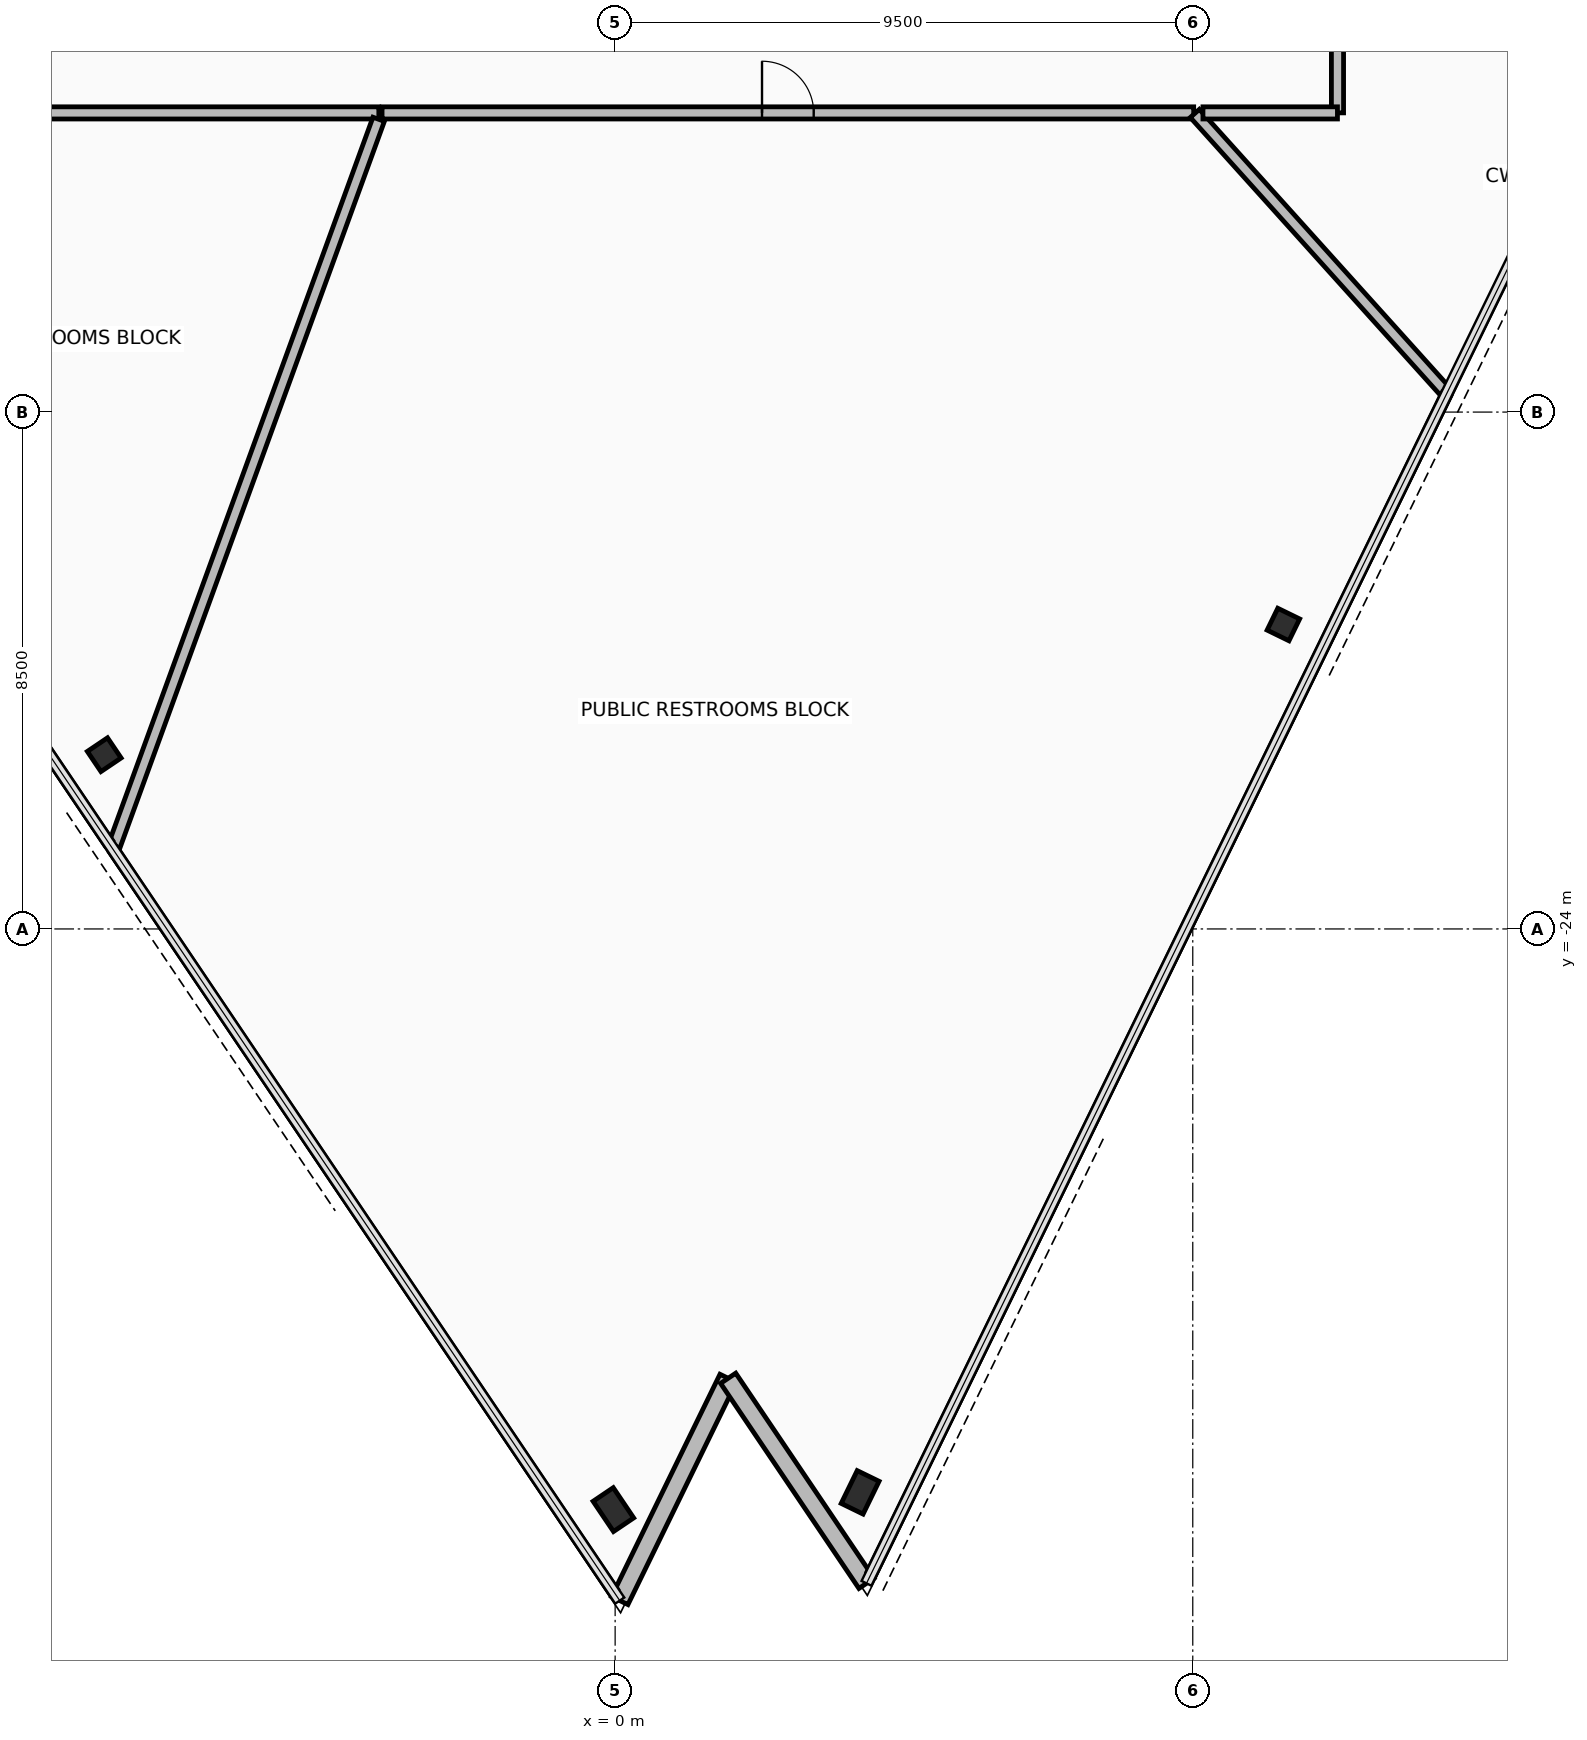
"""IFC4 building model, lengths in metres.
Left out: names, types, materials, properties, quantities, classifications, styles, units other than length and angle.
Written with IfcOpenShell. Run it as: python <this file> out.ifc"""

import sys

from ifc_helpers import new_model, si_unit, direction, frame, frame_2d, origin, origin_2d, place, context, subcontext, project, spatial, rectangle, hollow_rectangle, extrude, element, fill, save


model = new_model("IFC4")
c1 = context("Model", 3, precision=1e-05, world=origin(), true_north=direction((0.0, 1.0)))
c2 = subcontext(c1, "Body", "Model", "MODEL_VIEW")
j1 = project(units=[si_unit("LENGTHUNIT", "METRE"), si_unit("PLANEANGLEUNIT", "RADIAN")], contexts=[c1])
p1 = place(None, origin())
s1 = spatial("IfcSite", under=j1, at=p1, CompositionType="ELEMENT")
p2 = place(p1, origin())
s2 = spatial("IfcBuilding", under=s1, at=p2, CompositionType="ELEMENT")
p3 = place(p2, frame((0.0, 0.0, 257.0)))
s3 = spatial("IfcBuildingStorey", under=s2, at=p3, CompositionType="ELEMENT", Elevation=257.0)
p4 = place(p3, frame((-8.402, -21.135, 0.0), z_axis=(0.0, 0.0, 1.0), x_axis=(-0.559192903471, 0.829037572555, 0.0)))
e1 = element("IfcColumn", 1, at=p4, inside=s3, PredefinedType="COLUMN", context=c2, shape_type="SweptSolid", body=[
    extrude(hollow_rectangle(XDim=0.4, YDim=0.4, WallThickness=0.025, at=origin_2d()), origin(), (0.0, 0.0, 1.0), 3.6),
])
for number, where, z_axis, x_axis in (
    (2, (-0.029, -33.549, 0.0), (0.0, 0.0, 1.0), (-0.559, 0.829, 0.0)),
    (3, (4.029, -33.265, 0.0), (0.0, 0.0, 1.0), (0.438, 0.899, 0.0)),
):
    element("IfcColumn", number, at=place(p3, frame(where, z_axis=z_axis, x_axis=x_axis)), inside=s3, PredefinedType="COLUMN", context=c2, shape_type="SweptSolid", body=[
        extrude(hollow_rectangle(XDim=0.4, YDim=0.6, WallThickness=0.03, at=origin_2d()), origin(), (0.0, 0.0, 1.0), 3.6),
    ])
p5 = place(p3, frame((10.99, -18.994, 0.0), z_axis=(0.0, 0.0, 1.0), x_axis=(0.43837271548, 0.898793281196, 0.0)))
e4 = element("IfcColumn", 4, at=p5, inside=s3, PredefinedType="COLUMN", context=c2, shape_type="SweptSolid", body=[
    extrude(hollow_rectangle(XDim=0.4, YDim=0.4, WallThickness=0.025, at=origin_2d()), origin(), (0.0, 0.0, 1.0), 3.6),
])
p6 = place(p3, frame((0.076, -35.045, 0.0), z_axis=(0.0, 0.0, 1.0), x_axis=(0.438357414153, 0.898800744024, 0.0)))
e5 = element("IfcWall", 5, at=p6, inside=s3, PredefinedType="STANDARD", context=c2, shape_type="SweptSolid", body=[
    extrude(rectangle(XDim=4.068, YDim=0.3, at=frame_2d((2.034, 0.0))), origin(), (0.0, 0.0, 1.0), 2.765),
])
p7 = place(p3, frame((1.859, -31.389, 0.0), z_axis=(0.0, 0.0, 1.0), x_axis=(0.559206900681, -0.829028131145, 0.0)))
e6 = element("IfcWall", 6, at=p7, inside=s3, PredefinedType="STANDARD", context=c2, shape_type="SweptSolid", body=[
    extrude(rectangle(XDim=4.068, YDim=0.3, at=frame_2d((2.034, 0.0))), origin(), (0.0, 0.0, 1.0), 2.765),
])
p8 = place(p3, frame((-11.879, -10.58, 0.0), z_axis=(0.0, 0.0, 1.0), x_axis=(1.0, 0.0, 0.0)))
e7 = element("IfcWall", 7, at=p8, inside=s3, PredefinedType="PARTITIONING", context=c2, shape_type="SweptSolid", body=[
    extrude(rectangle(XDim=7.993, YDim=0.2, at=frame_2d((3.997, 0.0))), origin(), (0.0, 0.0, 1.0), 2.915),
])
p9 = place(p3, frame((-3.889, -10.685, 0.0), z_axis=(0.0, 0.0, 1.0), x_axis=(-0.342029991506, -0.939689036283, 0.0)))
e8 = element("IfcWall", 8, at=p9, inside=s3, PredefinedType="PARTITIONING", context=c2, shape_type="SweptSolid", body=[
    extrude(rectangle(XDim=12.775, YDim=0.2, at=frame_2d((6.387, 0.0))), origin(), (0.0, 0.0, 1.0), 2.765),
])
p10 = place(p3, frame((-8.331, -22.582, 0.0), z_axis=(0.0, 0.0, 1.0), x_axis=(-0.559190048569, 0.829039498203, 0.0)))
e9 = element("IfcWall", 9, at=p10, inside=s3, PredefinedType="PARTITIONING", context=c2, shape_type="SweptSolid", body=[
    extrude(rectangle(XDim=23.473, YDim=0.15, at=frame_2d((11.737, 0.0))), origin(), (0.0, 0.0, 1.0), 3.42),
])
p11 = place(p3, frame((-0.024, -34.897, 0.0), z_axis=(0.0, 0.0, 1.0), x_axis=(-0.55919551537, 0.829035810801, 0.0)))
e10 = element("IfcWall", 10, at=p11, inside=s3, PredefinedType="PARTITIONING", context=c2, shape_type="SweptSolid", body=[
    extrude(rectangle(XDim=14.712, YDim=0.15, at=frame_2d((7.356, 0.0))), origin(), (0.0, 0.0, 1.0), 3.42),
])
p12 = place(p3, frame((-3.833, -10.58, 0.0), z_axis=(0.0, 0.0, 1.0), x_axis=(1.0, 0.0, 0.0)))
e11 = element("IfcWall", 11, at=p12, inside=s3, PredefinedType="PARTITIONING", context=c2, shape_type="SweptSolid", body=[
    extrude(rectangle(XDim=13.348, YDim=0.2, at=frame_2d((6.674, 0.0))), origin(), (0.0, 0.0, 1.0), 2.915),
])
p13 = place(p12, frame((6.249, 0.0, 0.0)))
e12 = element("IfcOpeningElement", 12, at=p13, cuts=e11, PredefinedType="OPENING", context=c2, shape_type="SweptSolid", body=[
    extrude(rectangle(XDim=0.85, YDim=2.1, at=frame_2d((0.425, 1.05))), frame((0.0, 0.11, 0.0), z_axis=(0.0, -1.0, 0.0), x_axis=(1.0, 0.0, 0.0)), (0.0, 0.0, 1.0), 0.22),
])
p14 = place(p3, frame((9.534, -10.588, 0.0), z_axis=(0.0, 0.0, 1.0), x_axis=(0.669128466379, -0.743146752318, 0.0)))
e13 = element("IfcWall", 13, at=p14, inside=s3, PredefinedType="PARTITIONING", context=c2, shape_type="SweptSolid", body=[
    extrude(rectangle(XDim=6.178, YDim=0.2, at=frame_2d((3.089, 0.0))), origin(), (0.0, 0.0, 1.0), 2.765),
])
p15 = place(p3, frame((13.671, -15.207, 0.0), z_axis=(0.0, 0.0, 1.0), x_axis=(-0.438371022135, -0.898794107097, 0.0)))
e14 = element("IfcWall", 14, at=p15, inside=s3, PredefinedType="PARTITIONING", context=c2, shape_type="SweptSolid", body=[
    extrude(rectangle(XDim=21.578, YDim=0.15, at=frame_2d((10.789, 0.0))), origin(), (0.0, 0.0, 1.0), 3.42),
])
p16 = place(p3, frame((11.88, -10.579, 0.0), z_axis=(0.0, 0.0, 1.0), x_axis=(0.0, 1.0, 0.0)))
e15 = element("IfcWall", 15, at=p16, inside=s3, PredefinedType="PARTITIONING", context=c2, shape_type="SweptSolid", body=[
    extrude(rectangle(XDim=8.454, YDim=0.2, at=frame_2d((4.227, 0.0))), origin(), (0.0, 0.0, 1.0), 2.915),
])
p17 = place(p16, frame((3.627, 0.0, 0.0)))
e16 = element("IfcOpeningElement", 16, at=p17, cuts=e15, PredefinedType="OPENING", context=c2, shape_type="SweptSolid", body=[
    extrude(rectangle(XDim=1.2, YDim=2.15, at=frame_2d((0.6, 1.075))), frame((0.0, 0.11, 0.0), z_axis=(0.0, -1.0, 0.0), x_axis=(1.0, 0.0, 0.0)), (0.0, 0.0, 1.0), 0.22),
])
p18 = place(p3, frame((9.667, -10.58, 0.0), z_axis=(0.0, 0.0, 1.0), x_axis=(1.0, 0.0, 0.0)))
e17 = element("IfcWall", 17, at=p18, inside=s3, PredefinedType="PARTITIONING", context=c2, shape_type="SweptSolid", body=[
    extrude(rectangle(XDim=2.212, YDim=0.2, at=frame_2d((1.106, 0.0))), origin(), (0.0, 0.0, 1.0), 2.915),
])
p19 = place(p13, origin())
e18 = element("IfcDoor", 18, at=p19, inside=s3, OperationType="SINGLE_SWING_RIGHT", PredefinedType="DOOR", context=c2, shape_type="SweptSolid", body=[
    extrude(rectangle(XDim=0.85, YDim=2.1, at=frame_2d((0.425, 1.05))), frame((0.0, 0.025, 0.0), z_axis=(0.0, -1.0, 0.0), x_axis=(1.0, 0.0, 0.0)), (0.0, 0.0, 1.0), 0.05),
])
fill(e12, e18)
save(model, sys.argv[1])
